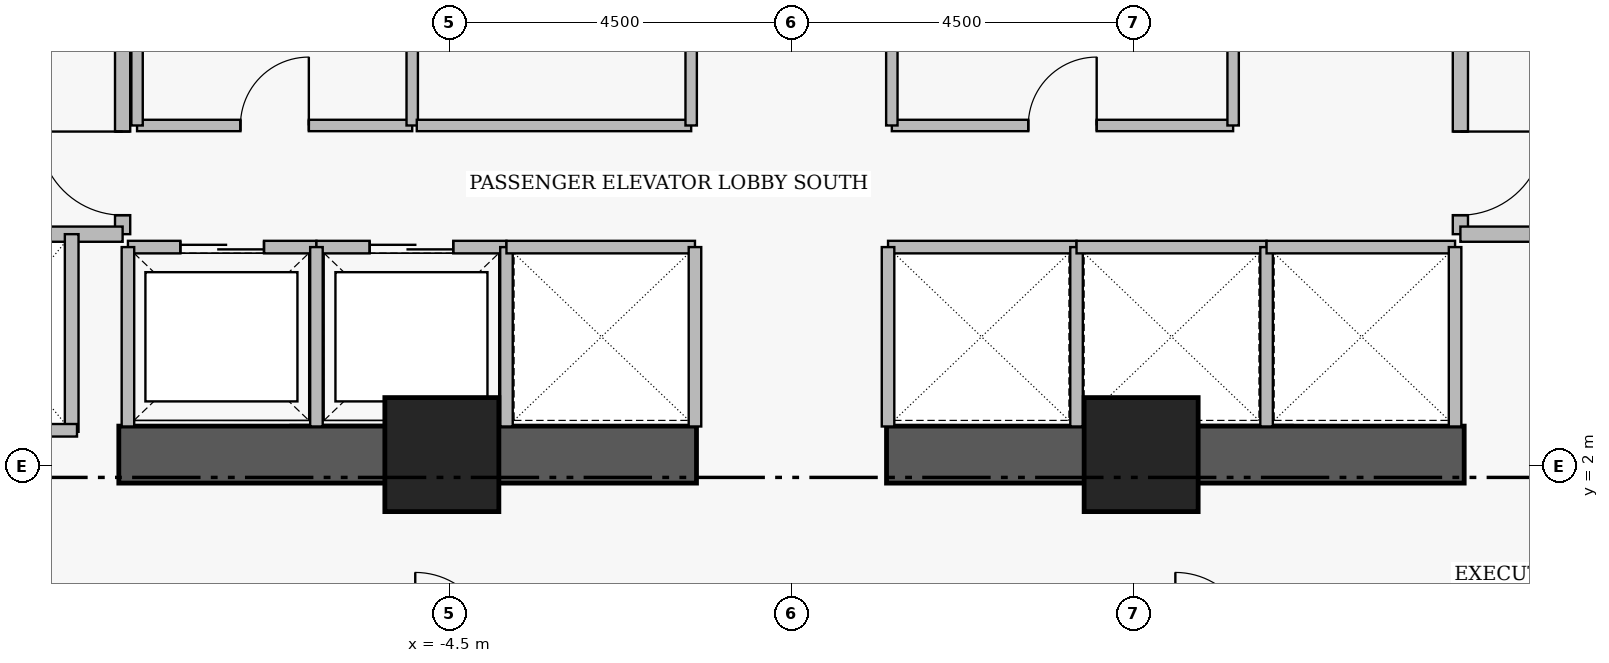
"""IFC4 building model, lengths in metres.
Left out: names, types, materials, properties, quantities, classifications, styles, units other than length and angle.
Written with IfcOpenShell. Run it as: python <this file> out.ifc"""

import sys

from ifc_helpers import new_model, si_unit, direction, frame, frame_2d, origin, origin_2d, place, context, subcontext, project, spatial, rectangle, extrude, element, fill, save


model = new_model("IFC4")
c1 = context("Model", 3, precision=1e-05, world=origin(), true_north=direction((0.0, 1.0)))
c2 = subcontext(c1, "Body", "Model", "MODEL_VIEW")
j1 = project(units=[si_unit("LENGTHUNIT", "METRE"), si_unit("PLANEANGLEUNIT", "RADIAN")], contexts=[c1])
p1 = place(None, origin())
s1 = spatial("IfcSite", under=j1, at=p1, CompositionType="ELEMENT")
p2 = place(p1, origin())
s2 = spatial("IfcBuilding", under=s1, at=p2, CompositionType="ELEMENT")
p3 = place(p2, frame((0.0, 0.0, 139.45)))
s3 = spatial("IfcBuildingStorey", under=s2, at=p3, CompositionType="ELEMENT", Elevation=139.45)
for number, where, z_axis, x_axis in (
    (1, (-8.85, 2.15, 0.0), (0.0, 0.0, 1.0), (1.0, 0.0, 0.0)),
    (2, (1.25, 2.15, 0.0), (0.0, 0.0, 1.0), (1.0, 0.0, 0.0)),
):
    element("IfcWall", number, at=place(p3, frame(where, z_axis=z_axis, x_axis=x_axis)), inside=s3, PredefinedType="SHEAR", context=c2, shape_type="SweptSolid", body=[
        extrude(rectangle(XDim=7.6, YDim=0.75, at=frame_2d((3.8, 0.0))), origin(), (0.0, 0.0, 1.0), 3.43),
    ])
for number, where, z_axis, x_axis in (
    (3, (-4.6, 2.15, 0.0), (0.0, 0.0, 1.0), (1.0, 0.0, 0.0)),
    (4, (4.6, 2.15, 0.0), (0.0, 0.0, 1.0), (1.0, 0.0, 0.0)),
):
    element("IfcColumn", number, at=place(p3, frame(where, z_axis=z_axis, x_axis=x_axis)), inside=s3, PredefinedType="COLUMN", context=c2, shape_type="SweptSolid", body=[
        extrude(rectangle(XDim=1.5, YDim=1.5, at=origin_2d()), origin(), (0.0, 0.0, 1.0), 3.65),
    ])
p4 = place(p3, frame((-8.8, 5.05, 0.0), z_axis=(0.0, 0.0, 1.0), x_axis=(0.0, 1.0, 0.0)))
e5 = element("IfcWall", 5, at=p4, inside=s3, PredefinedType="PARTITIONING", context=c2, shape_type="SweptSolid", body=[
    extrude(rectangle(XDim=6.1, YDim=0.2, at=frame_2d((3.05, 0.0))), origin(), (0.0, 0.0, 1.0), 3.43),
])
p5 = place(p4, frame((0.25, 0.0, 0.0)))
e6 = element("IfcOpeningElement", 6, at=p5, cuts=e5, PredefinedType="OPENING", context=c2, shape_type="SweptSolid", body=[
    extrude(rectangle(XDim=1.1, YDim=2.2, at=frame_2d((0.55, 1.1))), frame((0.0, 0.11, 0.0), z_axis=(0.0, -1.0, 0.0), x_axis=(1.0, 0.0, 0.0)), (0.0, 0.0, 1.0), 0.22),
])
p6 = place(p4, frame((3.85, 0.0, 0.0)))
e7 = element("IfcOpeningElement", 7, at=p6, cuts=e5, PredefinedType="OPENING", context=c2, shape_type="SweptSolid", body=[
    extrude(rectangle(XDim=1.1, YDim=2.2, at=frame_2d((0.55, 1.1))), frame((0.0, 0.11, 0.0), z_axis=(0.0, -1.0, 0.0), x_axis=(1.0, 0.0, 0.0)), (0.0, 0.0, 1.0), 0.22),
])
p7 = place(p3, frame((8.8, 11.15, 0.0), z_axis=(0.0, 0.0, 1.0), x_axis=(0.0, -1.0, 0.0)))
e8 = element("IfcWall", 8, at=p7, inside=s3, PredefinedType="PARTITIONING", context=c2, shape_type="SweptSolid", body=[
    extrude(rectangle(XDim=6.1, YDim=0.2, at=frame_2d((3.05, 0.0))), origin(), (0.0, 0.0, 1.0), 3.43),
])
p8 = place(p7, frame((1.15, 0.0, 0.0)))
e9 = element("IfcOpeningElement", 9, at=p8, cuts=e8, PredefinedType="OPENING", context=c2, shape_type="SweptSolid", body=[
    extrude(rectangle(XDim=1.1, YDim=2.2, at=frame_2d((0.55, 1.1))), frame((0.0, 0.11, 0.0), z_axis=(0.0, -1.0, 0.0), x_axis=(1.0, 0.0, 0.0)), (0.0, 0.0, 1.0), 0.22),
])
p9 = place(p7, frame((4.75, 0.0, 0.0)))
e10 = element("IfcOpeningElement", 10, at=p9, cuts=e8, PredefinedType="OPENING", context=c2, shape_type="SweptSolid", body=[
    extrude(rectangle(XDim=1.1, YDim=2.2, at=frame_2d((0.55, 1.1))), frame((0.0, 0.11, 0.0), z_axis=(0.0, -1.0, 0.0), x_axis=(1.0, 0.0, 0.0)), (0.0, 0.0, 1.0), 0.22),
])
p10 = place(p3, frame((-8.73, 4.88, 0.0), z_axis=(0.0, 0.0, 1.0), x_axis=(1.0, 0.0, 0.0)))
e11 = element("IfcWall", 11, at=p10, inside=s3, PredefinedType="PARTITIONING", context=c2, shape_type="SweptSolid", body=[
    extrude(rectangle(XDim=2.48, YDim=0.165, at=frame_2d((1.24, 0.0))), origin(), (0.0, 0.0, 1.0), 3.43),
])
p11 = place(p10, frame((0.69, 0.0, 0.0)))
e12 = element("IfcOpeningElement", 12, at=p11, cuts=e11, PredefinedType="OPENING", context=c2, shape_type="SweptSolid", body=[
    extrude(rectangle(XDim=1.1, YDim=2.25, at=frame_2d((0.55, 1.125))), frame((0.0, 0.093, 0.0), z_axis=(0.0, -1.0, 0.0), x_axis=(1.0, 0.0, 0.0)), (0.0, 0.0, 1.0), 0.185),
])
p12 = place(p3, frame((-6.25, 4.88, 0.0), z_axis=(0.0, 0.0, 1.0), x_axis=(1.0, 0.0, 0.0)))
e13 = element("IfcWall", 13, at=p12, inside=s3, PredefinedType="PARTITIONING", context=c2, shape_type="SweptSolid", body=[
    extrude(rectangle(XDim=2.5, YDim=0.165, at=frame_2d((1.25, 0.0))), origin(), (0.0, 0.0, 1.0), 3.43),
])
p13 = place(p12, frame((0.7, 0.0, 0.0)))
e14 = element("IfcOpeningElement", 14, at=p13, cuts=e13, PredefinedType="OPENING", context=c2, shape_type="SweptSolid", body=[
    extrude(rectangle(XDim=1.1, YDim=2.25, at=frame_2d((0.55, 1.125))), frame((0.0, 0.093, 0.0), z_axis=(0.0, -1.0, 0.0), x_axis=(1.0, 0.0, 0.0)), (0.0, 0.0, 1.0), 0.185),
])
p14 = place(p3, frame((-8.61, 6.48, 0.0), z_axis=(0.0, 0.0, 1.0), x_axis=(1.0, 0.0, 0.0)))
e15 = element("IfcWall", 15, at=p14, inside=s3, PredefinedType="PARTITIONING", context=c2, shape_type="SweptSolid", body=[
    extrude(rectangle(XDim=3.62, YDim=0.15, at=frame_2d((1.81, 0.0))), origin(), (0.0, 0.0, 1.0), 3.43),
])
p15 = place(p14, frame((1.36, 0.0, 0.0)))
e16 = element("IfcOpeningElement", 16, at=p15, cuts=e15, PredefinedType="OPENING", context=c2, shape_type="SweptSolid", body=[
    extrude(rectangle(XDim=0.9, YDim=2.15, at=frame_2d((0.45, 1.075))), frame((0.0, 0.085, 0.0), z_axis=(0.0, -1.0, 0.0), x_axis=(1.0, 0.0, 0.0)), (0.0, 0.0, 1.0), 0.17),
])
p16 = place(p3, frame((1.32, 6.48, 0.0), z_axis=(0.0, 0.0, 1.0), x_axis=(1.0, 0.0, 0.0)))
e17 = element("IfcWall", 17, at=p16, inside=s3, PredefinedType="PARTITIONING", context=c2, shape_type="SweptSolid", body=[
    extrude(rectangle(XDim=4.49, YDim=0.15, at=frame_2d((2.245, 0.0))), origin(), (0.0, 0.0, 1.0), 3.43),
])
p17 = place(p16, frame((1.795, 0.0, 0.0)))
e18 = element("IfcOpeningElement", 18, at=p17, cuts=e17, PredefinedType="OPENING", context=c2, shape_type="SweptSolid", body=[
    extrude(rectangle(XDim=0.9, YDim=2.15, at=frame_2d((0.45, 1.075))), frame((0.0, 0.085, 0.0), z_axis=(0.0, -1.0, 0.0), x_axis=(1.0, 0.0, 0.0)), (0.0, 0.0, 1.0), 0.17),
])
for number, where, z_axis, x_axis in (
    (19, (-11.65, 5.05, 0.0), (0.0, 0.0, 1.0), (1.0, 0.0, 0.0)),
    (20, (8.8, 5.05, 0.0), (0.0, 0.0, 1.0), (1.0, 0.0, 0.0)),
):
    element("IfcWall", number, at=place(p3, frame(where, z_axis=z_axis, x_axis=x_axis)), inside=s3, PredefinedType="PARTITIONING", context=c2, shape_type="SweptSolid", body=[
        extrude(rectangle(XDim=2.85, YDim=0.2, at=frame_2d((1.425, 0.0))), origin(), (0.0, 0.0, 1.0), 3.43),
    ])
for number, where, z_axis, x_axis in (
    (21, (-8.73, 2.52, 0.0), (0.0, 0.0, 1.0), (0.0, 1.0, 0.0)),
    (22, (-6.25, 2.52, 0.0), (0.0, 0.0, 1.0), (0.0, 1.0, 0.0)),
    (23, (-3.75, 2.52, 0.0), (0.0, 0.0, 1.0), (0.0, 1.0, 0.0)),
):
    element("IfcWall", number, at=place(p3, frame(where, z_axis=z_axis, x_axis=x_axis)), inside=s3, PredefinedType="PARTITIONING", context=c2, shape_type="SweptSolid", body=[
        extrude(rectangle(XDim=2.36, YDim=0.165, at=frame_2d((1.18, 0.0))), origin(), (0.0, 0.0, 1.0), 3.43),
    ])
p18 = place(p3, frame((-3.75, 4.88, 0.0), z_axis=(0.0, 0.0, 1.0), x_axis=(1.0, 0.0, 0.0)))
e24 = element("IfcWall", 24, at=p18, inside=s3, PredefinedType="PARTITIONING", context=c2, shape_type="SweptSolid", body=[
    extrude(rectangle(XDim=2.48, YDim=0.165, at=frame_2d((1.24, 0.0))), origin(), (0.0, 0.0, 1.0), 3.43),
])
p19 = place(p3, frame((-1.27, 2.52, 0.0), z_axis=(0.0, 0.0, 1.0), x_axis=(0.0, 1.0, 0.0)))
e25 = element("IfcWall", 25, at=p19, inside=s3, PredefinedType="PARTITIONING", context=c2, shape_type="SweptSolid", body=[
    extrude(rectangle(XDim=2.36, YDim=0.165, at=frame_2d((1.18, 0.0))), origin(), (0.0, 0.0, 1.0), 3.43),
])
p20 = place(p3, frame((1.27, 4.88, 0.0), z_axis=(0.0, 0.0, 1.0), x_axis=(1.0, 0.0, 0.0)))
e26 = element("IfcWall", 26, at=p20, inside=s3, PredefinedType="PARTITIONING", context=c2, shape_type="SweptSolid", body=[
    extrude(rectangle(XDim=2.48, YDim=0.165, at=frame_2d((1.24, 0.0))), origin(), (0.0, 0.0, 1.0), 3.43),
])
for number, where, z_axis, x_axis in (
    (27, (1.27, 2.52, 0.0), (0.0, 0.0, 1.0), (0.0, 1.0, 0.0)),
    (28, (3.75, 2.52, 0.0), (0.0, 0.0, 1.0), (0.0, 1.0, 0.0)),
):
    element("IfcWall", number, at=place(p3, frame(where, z_axis=z_axis, x_axis=x_axis)), inside=s3, PredefinedType="PARTITIONING", context=c2, shape_type="SweptSolid", body=[
        extrude(rectangle(XDim=2.36, YDim=0.165, at=frame_2d((1.18, 0.0))), origin(), (0.0, 0.0, 1.0), 3.43),
    ])
p21 = place(p3, frame((3.75, 4.88, 0.0), z_axis=(0.0, 0.0, 1.0), x_axis=(1.0, 0.0, 0.0)))
e29 = element("IfcWall", 29, at=p21, inside=s3, PredefinedType="PARTITIONING", context=c2, shape_type="SweptSolid", body=[
    extrude(rectangle(XDim=2.5, YDim=0.165, at=frame_2d((1.25, 0.0))), origin(), (0.0, 0.0, 1.0), 3.43),
])
p22 = place(p3, frame((6.25, 2.52, 0.0), z_axis=(0.0, 0.0, 1.0), x_axis=(0.0, 1.0, 0.0)))
e30 = element("IfcWall", 30, at=p22, inside=s3, PredefinedType="PARTITIONING", context=c2, shape_type="SweptSolid", body=[
    extrude(rectangle(XDim=2.36, YDim=0.165, at=frame_2d((1.18, 0.0))), origin(), (0.0, 0.0, 1.0), 3.43),
])
p23 = place(p3, frame((6.25, 4.88, 0.0), z_axis=(0.0, 0.0, 1.0), x_axis=(1.0, 0.0, 0.0)))
e31 = element("IfcWall", 31, at=p23, inside=s3, PredefinedType="PARTITIONING", context=c2, shape_type="SweptSolid", body=[
    extrude(rectangle(XDim=2.48, YDim=0.165, at=frame_2d((1.24, 0.0))), origin(), (0.0, 0.0, 1.0), 3.43),
])
p24 = place(p3, frame((8.73, 2.52, 0.0), z_axis=(0.0, 0.0, 1.0), x_axis=(0.0, 1.0, 0.0)))
e32 = element("IfcWall", 32, at=p24, inside=s3, PredefinedType="PARTITIONING", context=c2, shape_type="SweptSolid", body=[
    extrude(rectangle(XDim=2.36, YDim=0.165, at=frame_2d((1.18, 0.0))), origin(), (0.0, 0.0, 1.0), 3.43),
])
p25 = place(p3, frame((-9.47, 2.45, 0.0), z_axis=(0.0, 0.0, 1.0), x_axis=(0.0, 1.0, 0.0)))
e33 = element("IfcWall", 33, at=p25, inside=s3, PredefinedType="PARTITIONING", context=c2, shape_type="SweptSolid", body=[
    extrude(rectangle(XDim=2.6, YDim=0.18, at=frame_2d((1.3, 0.0))), origin(), (0.0, 0.0, 1.0), 3.43),
])
p26 = place(p3, frame((-11.71, 2.47, 0.0), z_axis=(0.0, 0.0, 1.0), x_axis=(1.0, 0.0, 0.0)))
e34 = element("IfcWall", 34, at=p26, inside=s3, PredefinedType="PARTITIONING", context=c2, shape_type="SweptSolid", body=[
    extrude(rectangle(XDim=2.31, YDim=0.165, at=frame_2d((1.155, 0.0))), origin(), (0.0, 0.0, 1.0), 2.03),
])
for number, where, z_axis, x_axis in (
    (35, (-8.61, 6.48, 0.0), (0.0, 0.0, 1.0), (0.0, 1.0, 0.0)),
    (36, (-4.99, 6.48, 0.0), (0.0, 0.0, 1.0), (0.0, 1.0, 0.0)),
):
    element("IfcWall", number, at=place(p3, frame(where, z_axis=z_axis, x_axis=x_axis)), inside=s3, PredefinedType="PARTITIONING", context=c2, shape_type="SweptSolid", body=[
        extrude(rectangle(XDim=2.24, YDim=0.15, at=frame_2d((1.12, 0.0))), origin(), (0.0, 0.0, 1.0), 3.43),
    ])
p27 = place(p3, frame((-4.93, 6.48, 0.0), z_axis=(0.0, 0.0, 1.0), x_axis=(1.0, 0.0, 0.0)))
e37 = element("IfcWall", 37, at=p27, inside=s3, PredefinedType="PARTITIONING", context=c2, shape_type="SweptSolid", body=[
    extrude(rectangle(XDim=3.61, YDim=0.15, at=frame_2d((1.805, 0.0))), origin(), (0.0, 0.0, 1.0), 3.43),
])
for number, where, z_axis, x_axis in (
    (38, (-1.32, 6.48, 0.0), (0.0, 0.0, 1.0), (0.0, 1.0, 0.0)),
    (39, (1.32, 6.48, 0.0), (0.0, 0.0, 1.0), (0.0, 1.0, 0.0)),
    (40, (5.81, 6.48, 0.0), (0.0, 0.0, 1.0), (0.0, 1.0, 0.0)),
):
    element("IfcWall", number, at=place(p3, frame(where, z_axis=z_axis, x_axis=x_axis)), inside=s3, PredefinedType="PARTITIONING", context=c2, shape_type="SweptSolid", body=[
        extrude(rectangle(XDim=2.24, YDim=0.15, at=frame_2d((1.12, 0.0))), origin(), (0.0, 0.0, 1.0), 3.43),
    ])
p28 = place(p5, origin())
e41 = element("IfcDoor", 41, at=p28, inside=s3, OperationType="SINGLE_SWING_RIGHT", PredefinedType="DOOR", context=c2, shape_type="SweptSolid", body=[
    extrude(rectangle(XDim=1.1, YDim=2.2, at=frame_2d((0.55, 1.1))), frame((0.0, 0.025, 0.0), z_axis=(0.0, -1.0, 0.0), x_axis=(1.0, 0.0, 0.0)), (0.0, 0.0, 1.0), 0.05),
])
fill(e6, e41)
p29 = place(p9, origin())
e42 = element("IfcDoor", 42, at=p29, inside=s3, OperationType="SINGLE_SWING_LEFT", PredefinedType="DOOR", context=c2, shape_type="SweptSolid", body=[
    extrude(rectangle(XDim=1.1, YDim=2.2, at=frame_2d((0.55, 1.1))), frame((0.0, 0.025, 0.0), z_axis=(0.0, -1.0, 0.0), x_axis=(1.0, 0.0, 0.0)), (0.0, 0.0, 1.0), 0.05),
])
fill(e10, e42)
p30 = place(p11, origin())
e43 = element("IfcDoor", 43, at=p30, inside=s3, OperationType="SLIDING_TO_LEFT", PredefinedType="DOOR", context=c2, shape_type="SweptSolid", body=[
    extrude(rectangle(XDim=1.1, YDim=2.25, at=frame_2d((0.55, 1.125))), frame((0.0, 0.025, 0.0), z_axis=(0.0, -1.0, 0.0), x_axis=(1.0, 0.0, 0.0)), (0.0, 0.0, 1.0), 0.05),
])
fill(e12, e43)
p31 = place(p13, origin())
e44 = element("IfcDoor", 44, at=p31, inside=s3, OperationType="SLIDING_TO_LEFT", PredefinedType="DOOR", context=c2, shape_type="SweptSolid", body=[
    extrude(rectangle(XDim=1.1, YDim=2.25, at=frame_2d((0.55, 1.125))), frame((0.0, 0.025, 0.0), z_axis=(0.0, -1.0, 0.0), x_axis=(1.0, 0.0, 0.0)), (0.0, 0.0, 1.0), 0.05),
])
fill(e14, e44)
p32 = place(p15, origin())
e45 = element("IfcDoor", 45, at=p32, inside=s3, OperationType="SINGLE_SWING_RIGHT", PredefinedType="DOOR", context=c2, shape_type="SweptSolid", body=[
    extrude(rectangle(XDim=0.9, YDim=2.15, at=frame_2d((0.45, 1.075))), frame((0.0, 0.025, 0.0), z_axis=(0.0, -1.0, 0.0), x_axis=(1.0, 0.0, 0.0)), (0.0, 0.0, 1.0), 0.05),
])
fill(e16, e45)
p33 = place(p17, origin())
e46 = element("IfcDoor", 46, at=p33, inside=s3, OperationType="SINGLE_SWING_RIGHT", PredefinedType="DOOR", context=c2, shape_type="SweptSolid", body=[
    extrude(rectangle(XDim=0.9, YDim=2.15, at=frame_2d((0.45, 1.075))), frame((0.0, 0.025, 0.0), z_axis=(0.0, -1.0, 0.0), x_axis=(1.0, 0.0, 0.0)), (0.0, 0.0, 1.0), 0.05),
])
fill(e18, e46)
save(model, sys.argv[1])
